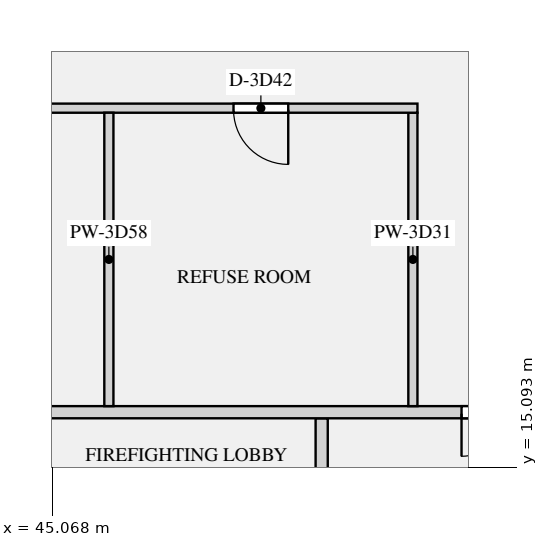
"""IFC4 building model, lengths in metres.
Left out: names, types, materials, properties, quantities, classifications, styles, units other than length and angle.
Written with IfcOpenShell. Run it as: python <this file> out.ifc"""

import sys

from ifc_helpers import new_model, si_unit, direction, frame, frame_2d, origin, place, context, subcontext, project, spatial, rectangle, extrude, element, fill, save


model = new_model("IFC4")
c1 = context("Model", 3, precision=1e-05, world=origin(), true_north=direction((0.0, 1.0)))
c2 = subcontext(c1, "Body", "Model", "MODEL_VIEW")
j1 = project(units=[si_unit("LENGTHUNIT", "METRE"), si_unit("PLANEANGLEUNIT", "RADIAN")], contexts=[c1])
p1 = place(None, origin())
s1 = spatial("IfcSite", under=j1, at=p1, CompositionType="ELEMENT")
p2 = place(p1, origin())
s2 = spatial("IfcBuilding", under=s1, at=p2, CompositionType="ELEMENT")
p3 = place(p2, frame((0.0, 0.0, 166.5)))
s3 = spatial("IfcBuildingStorey", under=s2, at=p3, CompositionType="ELEMENT", Elevation=166.5)
p4 = place(p3, frame((49.5, 12.5, 0.0), z_axis=(0.0, 0.0, 1.0), x_axis=(0.0, 1.0, 0.0)))
e1 = element("IfcWall", 1, at=p4, inside=s3, PredefinedType="PARTITIONING", context=c2, shape_type="SweptSolid", body=[
    extrude(rectangle(XDim=3.4, YDim=0.2, at=frame_2d((1.7, 0.0))), origin(), (0.0, 0.0, 1.0), 2.83),
])
p5 = place(p4, frame((1.15, 0.0, 0.0)))
e2 = element("IfcOpeningElement", 2, at=p5, cuts=e1, PredefinedType="OPENING", context=c2, shape_type="SweptSolid", body=[
    extrude(rectangle(XDim=1.1, YDim=2.1, at=frame_2d((0.55, 1.05))), frame((0.0, 0.11, 0.0), z_axis=(0.0, -1.0, 0.0), x_axis=(1.0, 0.0, 0.0)), (0.0, 0.0, 1.0), 0.22),
])
p6 = place(p3, frame((20.925, 21.0, 0.0), z_axis=(0.0, 0.0, 1.0), x_axis=(1.0, 0.0, 0.0)))
e3 = element("IfcWall", 3, at=p6, inside=s3, PredefinedType="PARTITIONING", context=c2, shape_type="SweptSolid", body=[
    extrude(rectangle(XDim=30.15, YDim=0.15, at=frame_2d((15.075, 0.0))), origin(), (0.0, 0.0, 1.0), 2.83),
])
p7 = place(p6, frame((2.125, 0.0, 0.0)))
e4 = element("IfcOpeningElement", 4, at=p7, cuts=e3, PredefinedType="OPENING", context=c2, shape_type="SweptSolid", body=[
    extrude(rectangle(XDim=0.9, YDim=2.1, at=frame_2d((0.45, 1.05))), frame((0.0, 0.085, 0.0), z_axis=(0.0, -1.0, 0.0), x_axis=(1.0, 0.0, 0.0)), (0.0, 0.0, 1.0), 0.17),
])
p8 = place(p6, frame((7.125, 0.0, 0.0)))
e5 = element("IfcOpeningElement", 5, at=p8, cuts=e3, PredefinedType="OPENING", context=c2, shape_type="SweptSolid", body=[
    extrude(rectangle(XDim=0.9, YDim=2.1, at=frame_2d((0.45, 1.05))), frame((0.0, 0.085, 0.0), z_axis=(0.0, -1.0, 0.0), x_axis=(1.0, 0.0, 0.0)), (0.0, 0.0, 1.0), 0.17),
])
p9 = place(p6, frame((12.125, 0.0, 0.0)))
e6 = element("IfcOpeningElement", 6, at=p9, cuts=e3, PredefinedType="OPENING", context=c2, shape_type="SweptSolid", body=[
    extrude(rectangle(XDim=0.9, YDim=2.1, at=frame_2d((0.45, 1.05))), frame((0.0, 0.085, 0.0), z_axis=(0.0, -1.0, 0.0), x_axis=(1.0, 0.0, 0.0)), (0.0, 0.0, 1.0), 0.17),
])
p10 = place(p6, frame((17.125, 0.0, 0.0)))
e7 = element("IfcOpeningElement", 7, at=p10, cuts=e3, PredefinedType="OPENING", context=c2, shape_type="SweptSolid", body=[
    extrude(rectangle(XDim=0.9, YDim=2.1, at=frame_2d((0.45, 1.05))), frame((0.0, 0.085, 0.0), z_axis=(0.0, -1.0, 0.0), x_axis=(1.0, 0.0, 0.0)), (0.0, 0.0, 1.0), 0.17),
])
p11 = place(p6, frame((22.125, 0.0, 0.0)))
e8 = element("IfcOpeningElement", 8, at=p11, cuts=e3, PredefinedType="OPENING", context=c2, shape_type="SweptSolid", body=[
    extrude(rectangle(XDim=0.9, YDim=2.1, at=frame_2d((0.45, 1.05))), frame((0.0, 0.085, 0.0), z_axis=(0.0, -1.0, 0.0), x_axis=(1.0, 0.0, 0.0)), (0.0, 0.0, 1.0), 0.17),
])
p12 = place(p6, frame((27.125, 0.0, 0.0)))
e9 = element("IfcOpeningElement", 9, at=p12, cuts=e3, PredefinedType="OPENING", context=c2, shape_type="SweptSolid", body=[
    extrude(rectangle(XDim=0.9, YDim=2.1, at=frame_2d((0.45, 1.05))), frame((0.0, 0.085, 0.0), z_axis=(0.0, -1.0, 0.0), x_axis=(1.0, 0.0, 0.0)), (0.0, 0.0, 1.0), 0.17),
])
p13 = place(p3, frame((17.9, 16.0, 0.0), z_axis=(0.0, 0.0, 1.0), x_axis=(1.0, 0.0, 0.0)))
e10 = element("IfcWall", 10, at=p13, inside=s3, PredefinedType="PARTITIONING", context=c2, shape_type="SweptSolid", body=[
    extrude(rectangle(XDim=36.2, YDim=0.2, at=frame_2d((18.1, 0.0))), origin(), (0.0, 0.0, 1.0), 2.83),
])
p14 = place(p13, frame((0.9, 0.0, 0.0)))
e11 = element("IfcOpeningElement", 11, at=p14, cuts=e10, PredefinedType="OPENING", context=c2, shape_type="SweptSolid", body=[
    extrude(rectangle(XDim=1.4, YDim=2.1, at=frame_2d((0.7, 1.05))), frame((0.0, 0.11, 0.0), z_axis=(0.0, -1.0, 0.0), x_axis=(1.0, 0.0, 0.0)), (0.0, 0.0, 1.0), 0.22),
])
p15 = place(p13, frame((33.9, 0.0, 0.0)))
e12 = element("IfcOpeningElement", 12, at=p15, cuts=e10, PredefinedType="OPENING", context=c2, shape_type="SweptSolid", body=[
    extrude(rectangle(XDim=1.4, YDim=2.1, at=frame_2d((0.7, 1.05))), frame((0.0, 0.11, 0.0), z_axis=(0.0, -1.0, 0.0), x_axis=(1.0, 0.0, 0.0)), (0.0, 0.0, 1.0), 0.22),
])
for number, where, z_axis, x_axis in (
    (13, (51.0, 16.1, 0.0), (0.0, 0.0, 1.0), (0.0, 1.0, 0.0)),
    (14, (46.0, 16.1, 0.0), (0.0, 0.0, 1.0), (0.0, 1.0, 0.0)),
):
    element("IfcWall", number, at=place(p3, frame(where, z_axis=z_axis, x_axis=x_axis)), inside=s3, PredefinedType="PARTITIONING", context=c2, shape_type="SweptSolid", body=[
        extrude(rectangle(XDim=4.825, YDim=0.15, at=frame_2d((2.413, 0.0))), origin(), (0.0, 0.0, 1.0), 2.83),
    ])
p16 = place(p15, frame((1.4, 0.0, 0.0), z_axis=(0.0, 0.0, 1.0), x_axis=(-1.0, 0.0, 0.0)))
e15 = element("IfcDoor", 15, at=p16, inside=s3, OperationType="DOUBLE_DOOR_SINGLE_SWING", PredefinedType="DOOR", context=c2, shape_type="SweptSolid", body=[
    extrude(rectangle(XDim=1.4, YDim=2.1, at=frame_2d((0.7, 1.05))), frame((0.0, 0.025, 0.0), z_axis=(0.0, -1.0, 0.0), x_axis=(1.0, 0.0, 0.0)), (0.0, 0.0, 1.0), 0.05),
])
fill(e12, e15)
p17 = place(p12, frame((0.9, 0.0, 0.0), z_axis=(0.0, 0.0, 1.0), x_axis=(-1.0, 0.0, 0.0)))
e16 = element("IfcDoor", 16, at=p17, inside=s3, OperationType="SINGLE_SWING_LEFT", PredefinedType="DOOR", context=c2, shape_type="SweptSolid", body=[
    extrude(rectangle(XDim=0.9, YDim=2.1, at=frame_2d((0.45, 1.05))), frame((0.0, 0.025, 0.0), z_axis=(0.0, -1.0, 0.0), x_axis=(1.0, 0.0, 0.0)), (0.0, 0.0, 1.0), 0.05),
])
fill(e9, e16)
save(model, sys.argv[1])
